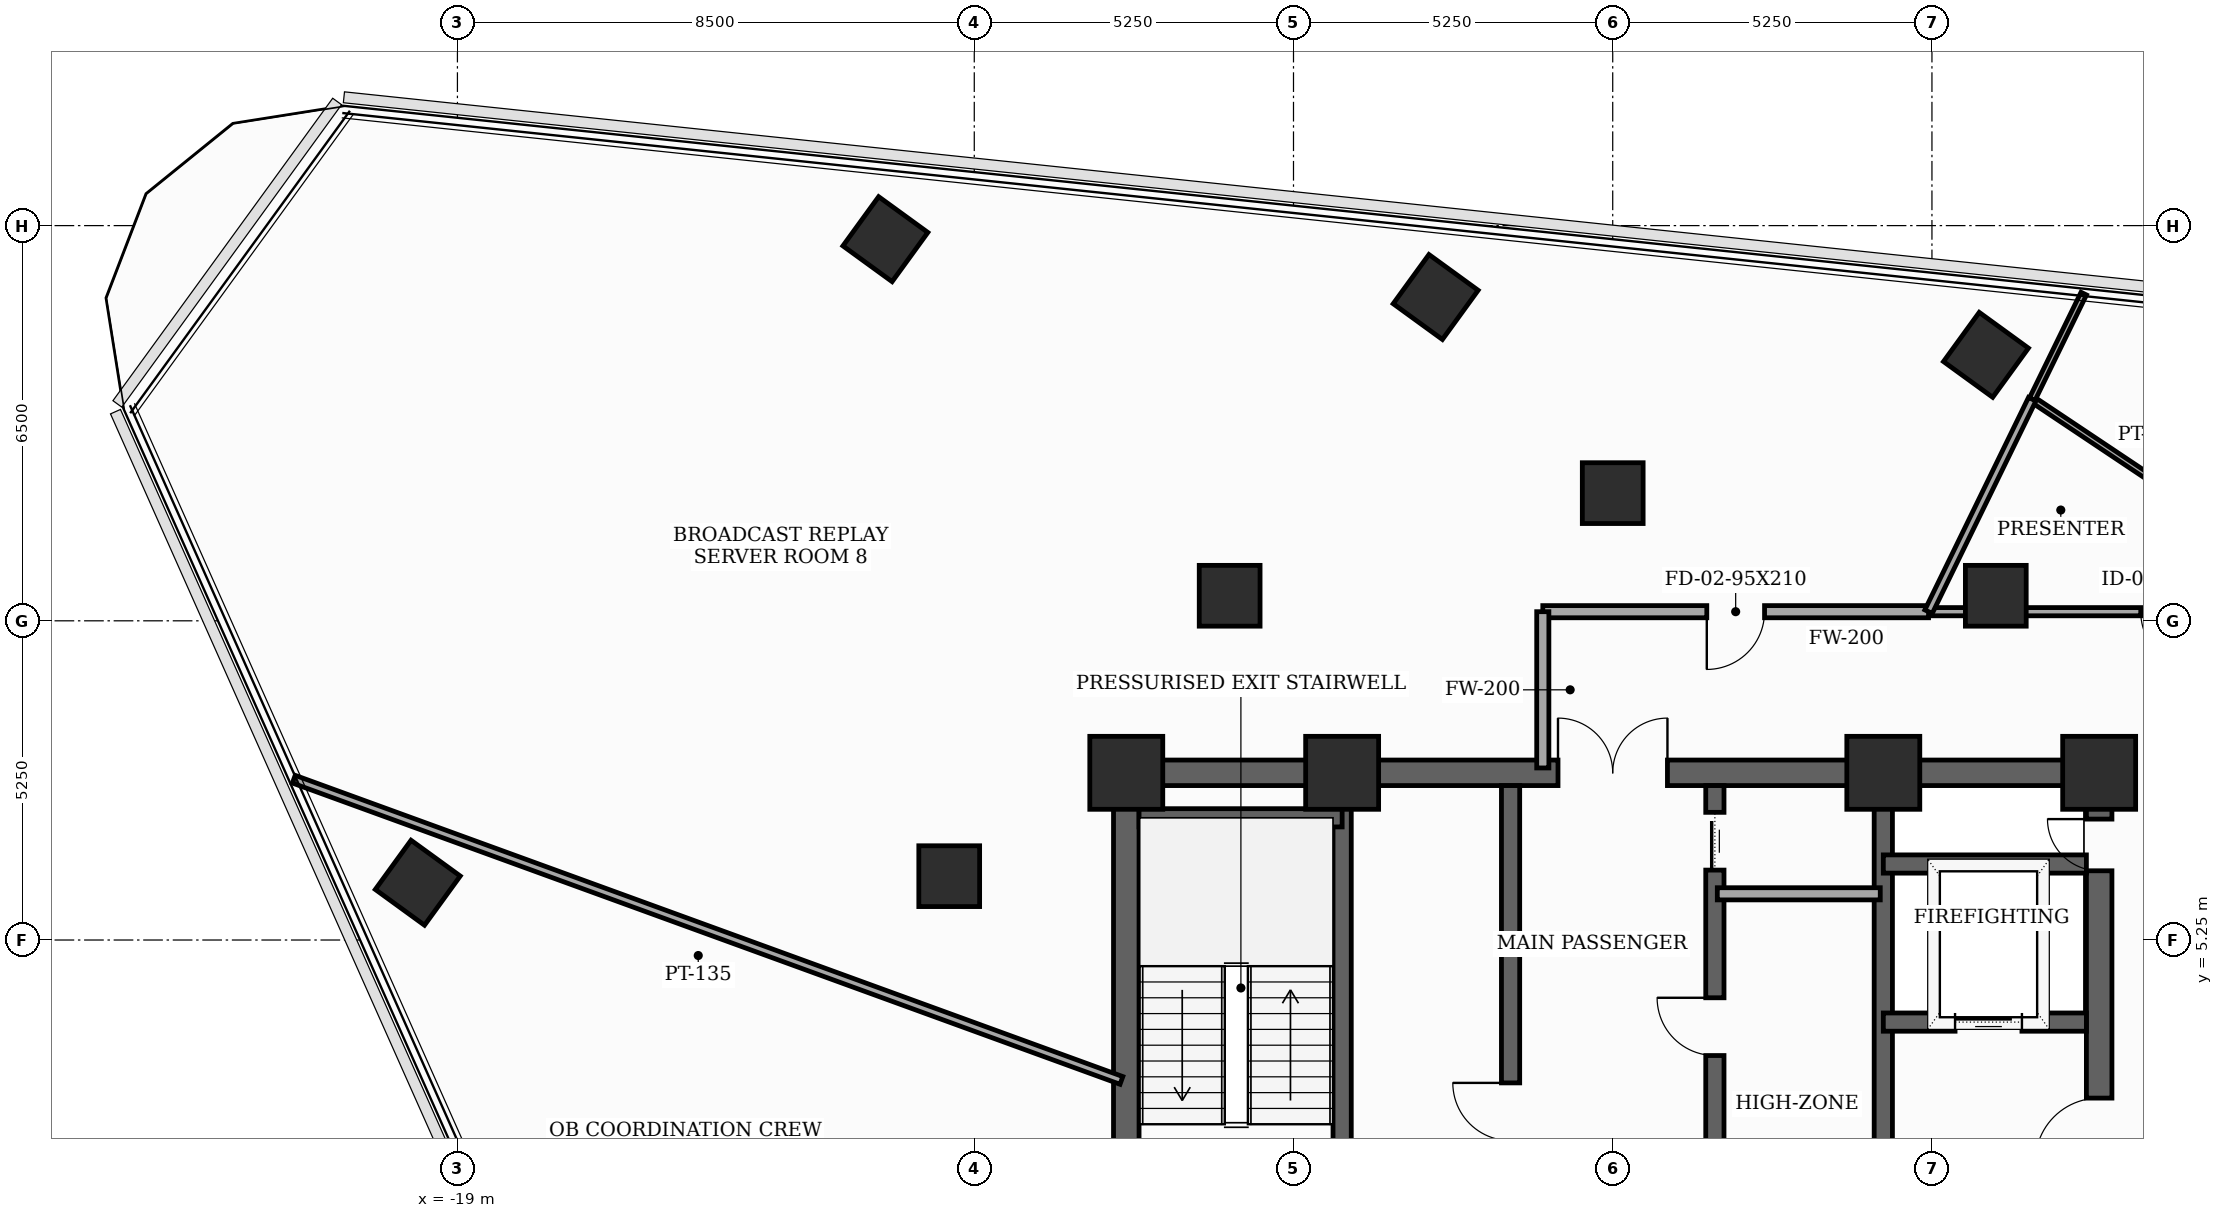
"""IFC4 building model, lengths in metres.
Left out: names, types, materials, properties, quantities, classifications, styles, units other than length and angle.
Written with IfcOpenShell. Run it as: python <this file> out.ifc"""

import sys

from ifc_helpers import new_model, si_unit, direction, frame, frame_2d, origin, origin_2d, place, context, subcontext, project, spatial, rectangle, extrude, element, fill, save


model = new_model("IFC4")
c1 = context("Model", 3, precision=1e-05, world=origin(), true_north=direction((0.0, 1.0)))
c2 = subcontext(c1, "Body", "Model", "MODEL_VIEW")
j1 = project(units=[si_unit("LENGTHUNIT", "METRE"), si_unit("PLANEANGLEUNIT", "RADIAN")], contexts=[c1])
p1 = place(None, origin())
s1 = spatial("IfcSite", under=j1, at=p1, CompositionType="ELEMENT")
p2 = place(p1, origin())
s2 = spatial("IfcBuilding", under=s1, at=p2, CompositionType="ELEMENT")
p3 = place(p2, frame((0.0, 0.0, 241.1)))
s3 = spatial("IfcBuildingStorey", under=s2, at=p3, CompositionType="ELEMENT", Elevation=241.1)
for number, where, z_axis, x_axis in (
    (1, (8.0, 8.0, 0.0), (0.0, 0.0, 1.0), (1.0, 0.0, 0.0)),
    (2, (4.45, 8.0, 0.0), (0.0, 0.0, 1.0), (1.0, 0.0, 0.0)),
    (3, (-4.45, 8.0, 0.0), (0.0, 0.0, 1.0), (1.0, 0.0, 0.0)),
    (4, (-8.0, 8.0, 0.0), (0.0, 0.0, 1.0), (1.0, 0.0, 0.0)),
):
    element("IfcColumn", number, at=place(p3, frame(where, z_axis=z_axis, x_axis=x_axis)), inside=s3, PredefinedType="COLUMN", context=c2, shape_type="SweptSolid", body=[
        extrude(rectangle(XDim=1.2, YDim=1.2, at=origin_2d()), origin(), (0.0, 0.0, 1.0), 3.7),
    ])
for number, where, z_axis, x_axis in (
    (5, (6.3, 10.912, 0.0), (0.0, 0.0, 1.0), (1.0, 0.0, 0.0)),
    (6, (0.0, 12.6, 0.0), (0.0, 0.0, 1.0), (1.0, 0.0, 0.0)),
    (7, (-6.3, 10.912, 0.0), (0.0, 0.0, 1.0), (1.0, 0.0, 0.0)),
    (8, (-10.912, 6.3, 0.0), (0.0, 0.0, 1.0), (1.0, 0.0, 0.0)),
    (9, (6.138, 14.875, 0.0), (0.0, 0.0, 1.0), (0.588, 0.809, 0.0)),
    (10, (-2.912, 15.826, 0.0), (0.0, 0.0, 1.0), (0.588, 0.809, 0.0)),
    (11, (-11.962, 16.777, 0.0), (0.0, 0.0, 1.0), (0.588, 0.809, 0.0)),
    (12, (-19.652, 6.192, 0.0), (0.0, 0.0, 1.0), (0.588, 0.809, 0.0)),
):
    element("IfcColumn", number, at=place(p3, frame(where, z_axis=z_axis, x_axis=x_axis)), inside=s3, PredefinedType="COLUMN", context=c2, shape_type="SweptSolid", body=[
        extrude(rectangle(XDim=1.0, YDim=1.0, at=origin_2d()), origin(), (0.0, 0.0, 1.0), 3.7),
    ])
p4 = place(p3, frame((-8.0, -8.0, 0.0), z_axis=(0.0, 0.0, 1.0), x_axis=(0.0, 1.0, 0.0)))
e13 = element("IfcWall", 13, at=p4, inside=s3, PredefinedType="SHEAR", context=c2, shape_type="SweptSolid", body=[
    extrude(rectangle(XDim=16.0, YDim=0.42, at=frame_2d((8.0, 0.0))), origin(), (0.0, 0.0, 1.0), 3.5),
])
p5 = place(p4, frame((0.761, 0.0, 0.0)))
e14 = element("IfcOpeningElement", 14, at=p5, cuts=e13, PredefinedType="OPENING", context=c2, shape_type="SweptSolid", body=[
    extrude(rectangle(XDim=0.85, YDim=2.02, at=frame_2d((0.425, 1.01))), frame((0.0, 0.22, 0.0), z_axis=(0.0, -1.0, 0.0), x_axis=(1.0, 0.0, 0.0)), (0.0, 0.0, 1.0), 0.44),
])
p6 = place(p4, frame((5.35, 0.0, 0.0)))
e15 = element("IfcOpeningElement", 15, at=p6, cuts=e13, PredefinedType="OPENING", context=c2, shape_type="SweptSolid", body=[
    extrude(rectangle(XDim=1.05, YDim=2.15, at=frame_2d((0.525, 1.075))), frame((0.0, 0.22, 0.0), z_axis=(0.0, -1.0, 0.0), x_axis=(1.0, 0.0, 0.0)), (0.0, 0.0, 1.0), 0.44),
])
p7 = place(p3, frame((8.0, -8.0, 0.0), z_axis=(0.0, 0.0, 1.0), x_axis=(0.0, 1.0, 0.0)))
e16 = element("IfcWall", 16, at=p7, inside=s3, PredefinedType="SHEAR", context=c2, shape_type="SweptSolid", body=[
    extrude(rectangle(XDim=16.0, YDim=0.42, at=frame_2d((8.0, 0.0))), origin(), (0.0, 0.0, 1.0), 3.5),
])
p8 = place(p7, frame((9.6, 0.0, 0.0)))
e17 = element("IfcOpeningElement", 17, at=p8, cuts=e16, PredefinedType="OPENING", context=c2, shape_type="SweptSolid", body=[
    extrude(rectangle(XDim=1.05, YDim=2.15, at=frame_2d((0.525, 1.075))), frame((0.0, 0.22, 0.0), z_axis=(0.0, -1.0, 0.0), x_axis=(1.0, 0.0, 0.0)), (0.0, 0.0, 1.0), 0.44),
])
p9 = place(p7, frame((14.389, 0.0, 0.0)))
e18 = element("IfcOpeningElement", 18, at=p9, cuts=e16, PredefinedType="OPENING", context=c2, shape_type="SweptSolid", body=[
    extrude(rectangle(XDim=0.85, YDim=2.02, at=frame_2d((0.425, 1.01))), frame((0.0, 0.22, 0.0), z_axis=(0.0, -1.0, 0.0), x_axis=(1.0, 0.0, 0.0)), (0.0, 0.0, 1.0), 0.44),
])
p10 = place(p3, frame((-8.0, 8.0, 0.0), z_axis=(0.0, 0.0, 1.0), x_axis=(1.0, 0.0, 0.0)))
e19 = element("IfcWall", 19, at=p10, inside=s3, PredefinedType="SHEAR", context=c2, shape_type="SweptSolid", body=[
    extrude(rectangle(XDim=16.0, YDim=0.42, at=frame_2d((8.0, 0.0))), origin(), (0.0, 0.0, 1.0), 3.5),
])
p11 = place(p10, frame((7.1, 0.0, 0.0)))
e20 = element("IfcOpeningElement", 20, at=p11, cuts=e19, PredefinedType="OPENING", context=c2, shape_type="SweptSolid", body=[
    extrude(rectangle(XDim=1.8, YDim=2.15, at=frame_2d((0.9, 1.075))), frame((0.0, 0.22, 0.0), z_axis=(0.0, -1.0, 0.0), x_axis=(1.0, 0.0, 0.0)), (0.0, 0.0, 1.0), 0.44),
])
for number, where, z_axis, x_axis in (
    (21, (-4.45, -7.79, 0.0), (0.0, 0.0, 1.0), (0.0, 1.0, 0.0)),
    (22, (4.45, -7.79, 0.0), (0.0, 0.0, 1.0), (0.0, 1.0, 0.0)),
):
    element("IfcWall", number, at=place(p3, frame(where, z_axis=z_axis, x_axis=x_axis)), inside=s3, PredefinedType="SHEAR", context=c2, shape_type="SweptSolid", body=[
        extrude(rectangle(XDim=15.58, YDim=0.3, at=frame_2d((7.79, 0.0))), origin(), (0.0, 0.0, 1.0), 3.5),
    ])
p12 = place(p3, frame((-7.79, 7.26, 0.0), z_axis=(0.0, 0.0, 1.0), x_axis=(1.0, 0.0, 0.0)))
e23 = element("IfcWall", 23, at=p12, inside=s3, PredefinedType="SHEAR", context=c2, shape_type="SweptSolid", body=[
    extrude(rectangle(XDim=3.34, YDim=0.3, at=frame_2d((1.67, 0.0))), origin(), (0.0, 0.0, 1.0), 3.5),
])
p13 = place(p3, frame((4.45, 3.9, 0.0), z_axis=(0.0, 0.0, 1.0), x_axis=(1.0, 0.0, 0.0)))
e24 = element("IfcWall", 24, at=p13, inside=s3, PredefinedType="SHEAR", context=c2, shape_type="SweptSolid", body=[
    extrude(rectangle(XDim=3.34, YDim=0.3, at=frame_2d((1.67, 0.0))), origin(), (0.0, 0.0, 1.0), 3.5),
])
p14 = place(p13, frame((1.18, 0.0, 0.0)))
e25 = element("IfcOpeningElement", 25, at=p14, cuts=e24, PredefinedType="OPENING", context=c2, shape_type="SweptSolid", body=[
    extrude(rectangle(XDim=1.1, YDim=2.1, at=frame_2d((0.55, 1.05))), frame((0.0, 0.16, 0.0), z_axis=(0.0, -1.0, 0.0), x_axis=(1.0, 0.0, 0.0)), (0.0, 0.0, 1.0), 0.32),
])
p15 = place(p3, frame((4.45, 6.5, 0.0), z_axis=(0.0, 0.0, 1.0), x_axis=(1.0, 0.0, 0.0)))
e26 = element("IfcWall", 26, at=p15, inside=s3, PredefinedType="SHEAR", context=c2, shape_type="SweptSolid", body=[
    extrude(rectangle(XDim=3.34, YDim=0.3, at=frame_2d((1.67, 0.0))), origin(), (0.0, 0.0, 1.0), 3.5),
])
p16 = place(p3, frame((-1.68, -4.85, 0.0), z_axis=(0.0, 0.0, 1.0), x_axis=(0.0, 1.0, 0.0)))
e27 = element("IfcWall", 27, at=p16, inside=s3, PredefinedType="SHEAR", context=c2, shape_type="SweptSolid", body=[
    extrude(rectangle(XDim=12.64, YDim=0.3, at=frame_2d((6.32, 0.0))), origin(), (0.0, 0.0, 1.0), 3.5),
])
p17 = place(p16, frame((1.05, 0.0, 0.0)))
e28 = element("IfcOpeningElement", 28, at=p17, cuts=e27, PredefinedType="OPENING", context=c2, shape_type="SweptSolid", body=[
    extrude(rectangle(XDim=0.85, YDim=2.02, at=frame_2d((0.425, 1.01))), frame((0.0, 0.16, 0.0), z_axis=(0.0, -1.0, 0.0), x_axis=(1.0, 0.0, 0.0)), (0.0, 0.0, 1.0), 0.32),
])
p18 = place(p16, frame((6.8, 0.0, 0.0)))
e29 = element("IfcOpeningElement", 29, at=p18, cuts=e27, PredefinedType="OPENING", context=c2, shape_type="SweptSolid", body=[
    extrude(rectangle(XDim=0.95, YDim=2.1, at=frame_2d((0.475, 1.05))), frame((0.0, 0.16, 0.0), z_axis=(0.0, -1.0, 0.0), x_axis=(1.0, 0.0, 0.0)), (0.0, 0.0, 1.0), 0.32),
])
p19 = place(p3, frame((1.68, -4.85, 0.0), z_axis=(0.0, 0.0, 1.0), x_axis=(0.0, 1.0, 0.0)))
e30 = element("IfcWall", 30, at=p19, inside=s3, PredefinedType="SHEAR", context=c2, shape_type="SweptSolid", body=[
    extrude(rectangle(XDim=12.64, YDim=0.3, at=frame_2d((6.32, 0.0))), origin(), (0.0, 0.0, 1.0), 3.5),
])
p20 = place(p19, frame((0.55, 0.0, 0.0)))
e31 = element("IfcOpeningElement", 31, at=p20, cuts=e30, PredefinedType="OPENING", context=c2, shape_type="SweptSolid", body=[
    extrude(rectangle(XDim=1.1, YDim=2.1, at=frame_2d((0.55, 1.05))), frame((0.0, 0.16, 0.0), z_axis=(0.0, -1.0, 0.0), x_axis=(1.0, 0.0, 0.0)), (0.0, 0.0, 1.0), 0.32),
])
p21 = place(p19, frame((2.65, 0.0, 0.0)))
e32 = element("IfcOpeningElement", 32, at=p21, cuts=e30, PredefinedType="OPENING", context=c2, shape_type="SweptSolid", body=[
    extrude(rectangle(XDim=1.1, YDim=2.1, at=frame_2d((0.55, 1.05))), frame((0.0, 0.16, 0.0), z_axis=(0.0, -1.0, 0.0), x_axis=(1.0, 0.0, 0.0)), (0.0, 0.0, 1.0), 0.32),
])
p22 = place(p19, frame((4.75, 0.0, 0.0)))
e33 = element("IfcOpeningElement", 33, at=p22, cuts=e30, PredefinedType="OPENING", context=c2, shape_type="SweptSolid", body=[
    extrude(rectangle(XDim=1.1, YDim=2.1, at=frame_2d((0.55, 1.05))), frame((0.0, 0.16, 0.0), z_axis=(0.0, -1.0, 0.0), x_axis=(1.0, 0.0, 0.0)), (0.0, 0.0, 1.0), 0.32),
])
p23 = place(p19, frame((8.2, 0.0, 0.0)))
e34 = element("IfcOpeningElement", 34, at=p23, cuts=e30, PredefinedType="OPENING", context=c2, shape_type="SweptSolid", body=[
    extrude(rectangle(XDim=0.95, YDim=2.1, at=frame_2d((0.475, 1.05))), frame((0.0, 0.16, 0.0), z_axis=(0.0, -1.0, 0.0), x_axis=(1.0, 0.0, 0.0)), (0.0, 0.0, 1.0), 0.32),
])
p24 = place(p19, frame((11.25, 0.0, 0.0)))
e35 = element("IfcOpeningElement", 35, at=p24, cuts=e30, PredefinedType="OPENING", context=c2, shape_type="SweptSolid", body=[
    extrude(rectangle(XDim=0.95, YDim=2.1, at=frame_2d((0.475, 1.05))), frame((0.0, 0.16, 0.0), z_axis=(0.0, -1.0, 0.0), x_axis=(1.0, 0.0, 0.0)), (0.0, 0.0, 1.0), 0.32),
])
p25 = place(p3, frame((1.72, 6.01, 0.0), z_axis=(0.0, 0.0, 1.0), x_axis=(1.0, 0.0, 0.0)))
e36 = element("IfcWall", 36, at=p25, inside=s3, PredefinedType="SOLIDWALL", context=c2, shape_type="SweptSolid", body=[
    extrude(rectangle(XDim=2.68, YDim=0.2, at=frame_2d((1.34, 0.0))), origin(), (0.0, 0.0, 1.0), 3.5),
])
p26 = place(p3, frame((10.15, 10.65, 0.0), z_axis=(0.0, 0.0, 1.0), x_axis=(-1.0, 0.0, 0.0)))
e37 = element("IfcWall", 37, at=p26, inside=s3, PredefinedType="PARTITIONING", context=c2, shape_type="SweptSolid", body=[
    extrude(rectangle(XDim=4.956, YDim=0.135, at=frame_2d((2.478, 0.0))), origin(), (0.0, 0.0, 1.0), 2.885),
])
p27 = place(p26, frame((0.516, 0.0, 0.0)))
e38 = element("IfcOpeningElement", 38, at=p27, cuts=e37, PredefinedType="OPENING", context=c2, shape_type="SweptSolid", body=[
    extrude(rectangle(XDim=0.95, YDim=2.1, at=frame_2d((0.475, 1.05))), frame((0.0, 0.077, 0.0), z_axis=(0.0, -1.0, 0.0), x_axis=(1.0, 0.0, 0.0)), (0.0, 0.0, 1.0), 0.155),
])
p28 = place(p3, frame((5.194, 10.65, 0.0), z_axis=(0.0, 0.0, 1.0), x_axis=(-1.0, 0.0, 0.0)))
e39 = element("IfcWall", 39, at=p28, inside=s3, PredefinedType="SOLIDWALL", context=c2, shape_type="SweptSolid", body=[
    extrude(rectangle(XDim=6.344, YDim=0.2, at=frame_2d((3.172, 0.0))), origin(), (0.0, 0.0, 1.0), 2.885),
])
p29 = place(p28, frame((2.697, 0.0, 0.0)))
e40 = element("IfcOpeningElement", 40, at=p29, cuts=e39, PredefinedType="OPENING", context=c2, shape_type="SweptSolid", body=[
    extrude(rectangle(XDim=0.95, YDim=2.1, at=frame_2d((0.475, 1.05))), frame((0.0, 0.11, 0.0), z_axis=(0.0, -1.0, 0.0), x_axis=(1.0, 0.0, 0.0)), (0.0, 0.0, 1.0), 0.22),
])
p30 = place(p3, frame((-1.15, 10.65, 0.0), z_axis=(0.0, 0.0, 1.0), x_axis=(0.0, -1.0, 0.0)))
e41 = element("IfcWall", 41, at=p30, inside=s3, PredefinedType="SOLIDWALL", context=c2, shape_type="SweptSolid", body=[
    extrude(rectangle(XDim=2.57, YDim=0.2, at=frame_2d((1.285, 0.0))), origin(), (0.0, 0.0, 1.0), 2.885),
])
p31 = place(p3, frame((-8.08, 2.941, 0.0), z_axis=(0.0, 0.0, 1.0), x_axis=(-0.939685602892, 0.342039424216, 0.0)))
e42 = element("IfcWall", 42, at=p31, inside=s3, PredefinedType="PARTITIONING", context=c2, shape_type="SweptSolid", body=[
    extrude(rectangle(XDim=14.485, YDim=0.135, at=frame_2d((7.242, 0.0))), origin(), (0.0, 0.0, 1.0), 2.885),
])
p32 = place(p3, frame((6.899, 14.145, 0.0), z_axis=(0.0, 0.0, 1.0), x_axis=(0.831510168033, -0.555509532283, 0.0)))
e43 = element("IfcWall", 43, at=p32, inside=s3, PredefinedType="MOVABLE", context=c2, shape_type="SweptSolid", body=[
    extrude(rectangle(XDim=4.663, YDim=0.1, at=frame_2d((2.331, 0.0))), origin(), (0.0, 0.0, 1.0), 3.5),
])
p33 = place(p3, frame((7.747, 15.882, 0.0), z_axis=(0.0, 0.0, 1.0), x_axis=(-0.438553034404, -0.898705310998, 0.0)))
e44 = element("IfcWall", 44, at=p33, inside=s3, PredefinedType="MOVABLE", context=c2, shape_type="SweptSolid", body=[
    extrude(rectangle(XDim=1.933, YDim=0.1, at=frame_2d((0.966, 0.0))), origin(), (0.0, 0.0, 1.0), 3.035),
])
p34 = place(p3, frame((6.899, 14.145, 0.0), z_axis=(0.0, 0.0, 1.0), x_axis=(-0.438402604201, -0.898778702813, 0.0)))
e45 = element("IfcWall", 45, at=p34, inside=s3, PredefinedType="PARTITIONING", context=c2, shape_type="SweptSolid", body=[
    extrude(rectangle(XDim=3.889, YDim=0.135, at=frame_2d((1.944, 0.0))), origin(), (0.0, 0.0, 1.0), 2.885),
])
p35 = place(p8, origin())
e46 = element("IfcDoor", 46, at=p35, inside=s3, OperationType="SINGLE_SWING_LEFT", PredefinedType="DOOR", context=c2, shape_type="SweptSolid", body=[
    extrude(rectangle(XDim=1.05, YDim=2.15, at=frame_2d((0.525, 1.075))), frame((0.0, 0.025, 0.0), z_axis=(0.0, -1.0, 0.0), x_axis=(1.0, 0.0, 0.0)), (0.0, 0.0, 1.0), 0.05),
])
fill(e17, e46)
p36 = place(p9, origin())
e47 = element("IfcDoor", 47, at=p36, inside=s3, OperationType="SINGLE_SWING_RIGHT", PredefinedType="TRAPDOOR", context=c2, shape_type="SweptSolid", body=[
    extrude(rectangle(XDim=0.85, YDim=2.02, at=frame_2d((0.425, 1.01))), frame((0.0, 0.025, 0.0), z_axis=(0.0, -1.0, 0.0), x_axis=(1.0, 0.0, 0.0)), (0.0, 0.0, 1.0), 0.05),
])
fill(e18, e47)
p37 = place(p11, origin())
e48 = element("IfcDoor", 48, at=p37, inside=s3, OperationType="DOUBLE_DOOR_SINGLE_SWING", PredefinedType="DOOR", context=c2, shape_type="SweptSolid", body=[
    extrude(rectangle(XDim=1.8, YDim=2.15, at=frame_2d((0.9, 1.075))), frame((0.0, 0.025, 0.0), z_axis=(0.0, -1.0, 0.0), x_axis=(1.0, 0.0, 0.0)), (0.0, 0.0, 1.0), 0.05),
])
fill(e20, e48)
p38 = place(p14, origin())
e49 = element("IfcDoor", 49, at=p38, inside=s3, OperationType="SLIDING_TO_LEFT", PredefinedType="DOOR", context=c2, shape_type="SweptSolid", body=[
    extrude(rectangle(XDim=1.1, YDim=2.1, at=frame_2d((0.55, 1.05))), frame((0.0, 0.025, 0.0), z_axis=(0.0, -1.0, 0.0), x_axis=(1.0, 0.0, 0.0)), (0.0, 0.0, 1.0), 0.05),
])
fill(e25, e49)
p39 = place(p18, origin())
e50 = element("IfcDoor", 50, at=p39, inside=s3, OperationType="SINGLE_SWING_RIGHT", PredefinedType="DOOR", context=c2, shape_type="SweptSolid", body=[
    extrude(rectangle(XDim=0.95, YDim=2.1, at=frame_2d((0.475, 1.05))), frame((0.0, 0.025, 0.0), z_axis=(0.0, -1.0, 0.0), x_axis=(1.0, 0.0, 0.0)), (0.0, 0.0, 1.0), 0.05),
])
fill(e29, e50)
p40 = place(p23, origin())
e51 = element("IfcDoor", 51, at=p40, inside=s3, OperationType="SINGLE_SWING_RIGHT", PredefinedType="DOOR", context=c2, shape_type="SweptSolid", body=[
    extrude(rectangle(XDim=0.95, YDim=2.1, at=frame_2d((0.475, 1.05))), frame((0.0, 0.025, 0.0), z_axis=(0.0, -1.0, 0.0), x_axis=(1.0, 0.0, 0.0)), (0.0, 0.0, 1.0), 0.05),
])
fill(e34, e51)
p41 = place(p24, origin())
e52 = element("IfcDoor", 52, at=p41, inside=s3, OperationType="SLIDING_TO_LEFT", PredefinedType="DOOR", context=c2, shape_type="SweptSolid", body=[
    extrude(rectangle(XDim=0.95, YDim=2.1, at=frame_2d((0.475, 1.05))), frame((0.0, 0.025, 0.0), z_axis=(0.0, -1.0, 0.0), x_axis=(1.0, 0.0, 0.0)), (0.0, 0.0, 1.0), 0.05),
])
fill(e35, e52)
p42 = place(p27, origin())
e53 = element("IfcDoor", 53, at=p42, inside=s3, OperationType="SINGLE_SWING_LEFT", PredefinedType="DOOR", context=c2, shape_type="SweptSolid", body=[
    extrude(rectangle(XDim=0.95, YDim=2.1, at=frame_2d((0.475, 1.05))), frame((0.0, 0.025, 0.0), z_axis=(0.0, -1.0, 0.0), x_axis=(1.0, 0.0, 0.0)), (0.0, 0.0, 1.0), 0.05),
])
fill(e38, e53)
p43 = place(p29, origin())
e54 = element("IfcDoor", 54, at=p43, inside=s3, OperationType="SINGLE_SWING_RIGHT", PredefinedType="DOOR", context=c2, shape_type="SweptSolid", body=[
    extrude(rectangle(XDim=0.95, YDim=2.1, at=frame_2d((0.475, 1.05))), frame((0.0, 0.025, 0.0), z_axis=(0.0, -1.0, 0.0), x_axis=(1.0, 0.0, 0.0)), (0.0, 0.0, 1.0), 0.05),
])
fill(e40, e54)
save(model, sys.argv[1])
